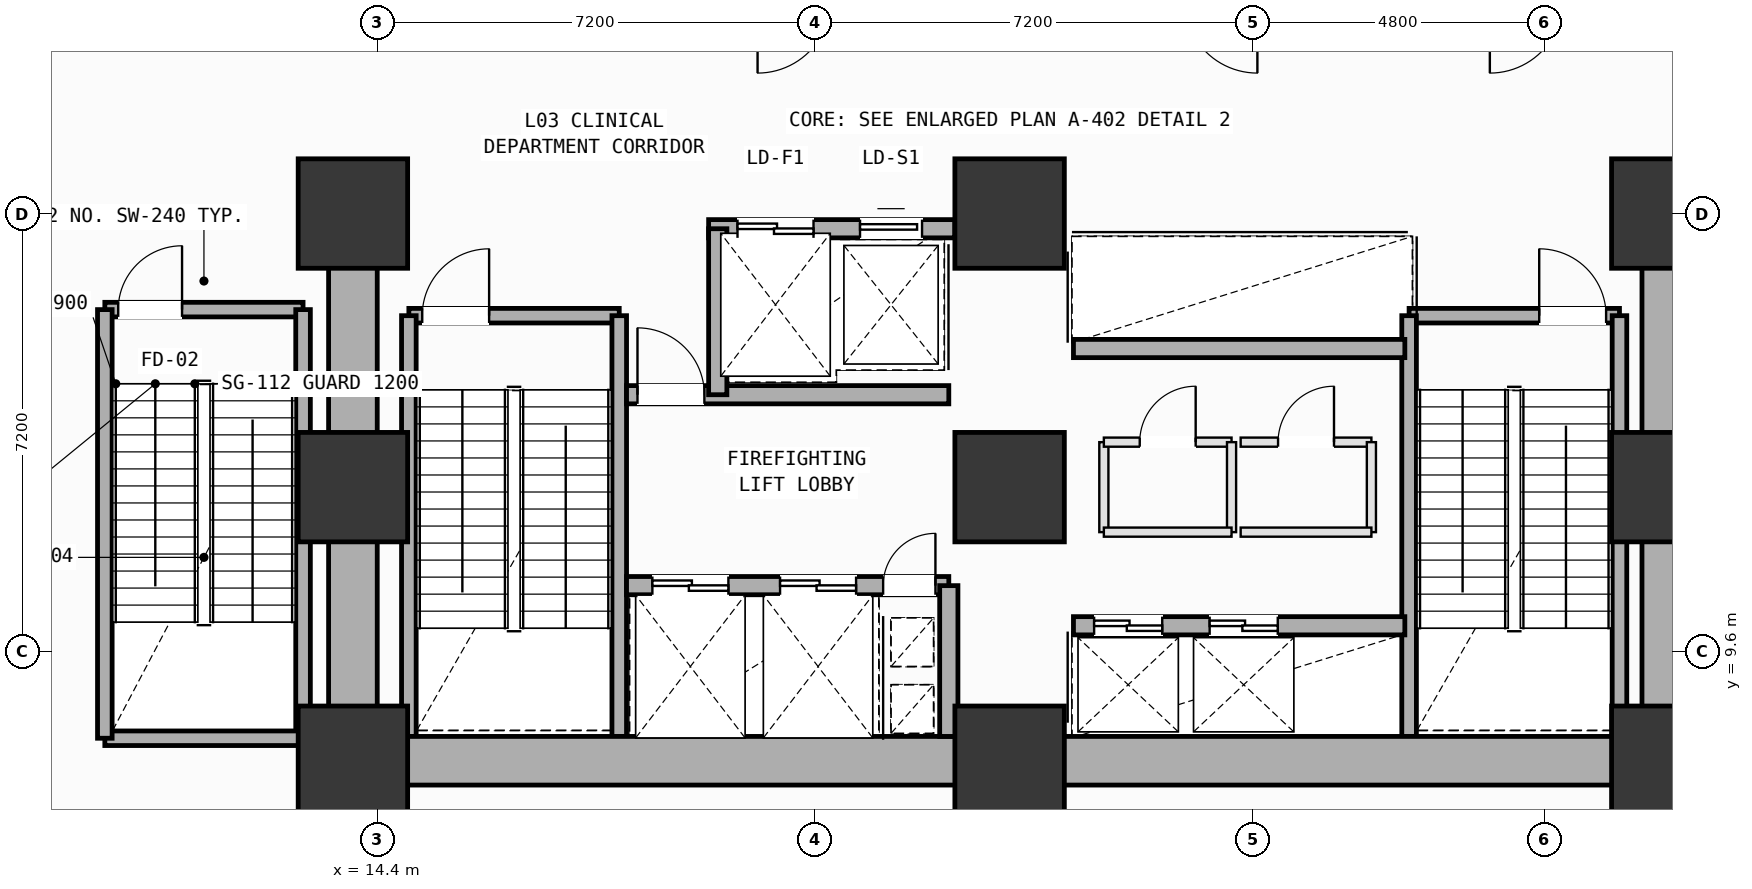
"""IFC4 building model, lengths in metres.
Left out: names, types, materials, properties, quantities, classifications, styles, units other than length and angle.
Written with IfcOpenShell. Run it as: python <this file> out.ifc"""

import sys

from ifc_helpers import new_model, si_unit, direction, frame, frame_2d, origin, origin_2d, place, context, subcontext, project, spatial, rectangle, extrude, element, fill, save


model = new_model("IFC4")
c1 = context("Model", 3, precision=1e-05, world=origin(), true_north=direction((0.0, 1.0)))
c2 = subcontext(c1, "Body", "Model", "MODEL_VIEW")
j1 = project(units=[si_unit("LENGTHUNIT", "METRE"), si_unit("PLANEANGLEUNIT", "RADIAN")], contexts=[c1])
p1 = place(None, origin())
s1 = spatial("IfcSite", under=j1, at=p1, CompositionType="ELEMENT")
p2 = place(p1, origin())
s2 = spatial("IfcBuilding", under=s1, at=p2, CompositionType="ELEMENT")
p3 = place(p2, frame((0.0, 0.0, 16.2)))
s3 = spatial("IfcBuildingStorey", under=s2, at=p3, CompositionType="ELEMENT", Elevation=16.2)
for number, where, z_axis, x_axis in (
    (1, (14.0, 7.8, 0.0), (0.0, 0.0, 1.0), (1.0, 0.0, 0.0)),
    (2, (14.0, 12.3, 0.0), (0.0, 0.0, 1.0), (1.0, 0.0, 0.0)),
    (3, (14.0, 16.8, 0.0), (0.0, 0.0, 1.0), (1.0, 0.0, 0.0)),
    (4, (24.8, 7.8, 0.0), (0.0, 0.0, 1.0), (1.0, 0.0, 0.0)),
    (5, (24.8, 12.3, 0.0), (0.0, 0.0, 1.0), (1.0, 0.0, 0.0)),
    (6, (24.8, 16.8, 0.0), (0.0, 0.0, 1.0), (1.0, 0.0, 0.0)),
    (7, (35.6, 7.8, 0.0), (0.0, 0.0, 1.0), (1.0, 0.0, 0.0)),
    (8, (35.6, 12.3, 0.0), (0.0, 0.0, 1.0), (1.0, 0.0, 0.0)),
    (9, (35.6, 16.8, 0.0), (0.0, 0.0, 1.0), (1.0, 0.0, 0.0)),
):
    element("IfcColumn", number, at=place(p3, frame(where, z_axis=z_axis, x_axis=x_axis)), inside=s3, PredefinedType="COLUMN", context=c2, shape_type="SweptSolid", body=[
        extrude(rectangle(XDim=1.8, YDim=1.8, at=origin_2d()), origin(), (0.0, 0.0, 1.0), 5.4),
    ])
p4 = place(p3, frame((14.92, 15.12, 0.0), z_axis=(0.0, 0.0, 1.0), x_axis=(1.0, 0.0, 0.0)))
e10 = element("IfcWall", 10, at=p4, inside=s3, PredefinedType="SOLIDWALL", context=c2, shape_type="SweptSolid", body=[
    extrude(rectangle(XDim=3.46, YDim=0.24, at=frame_2d((1.73, 0.0))), origin(), (0.0, 0.0, 1.0), 5.15),
])
p5 = place(p4, frame((0.22, 0.0, 0.0)))
e11 = element("IfcOpeningElement", 11, at=p5, cuts=e10, PredefinedType="OPENING", context=c2, shape_type="SweptSolid", body=[
    extrude(rectangle(XDim=1.1, YDim=2.15, at=frame_2d((0.55, 1.075))), frame((0.0, 0.13, 0.0), z_axis=(0.0, -1.0, 0.0), x_axis=(1.0, 0.0, 0.0)), (0.0, 0.0, 1.0), 0.26),
])
for number, where, z_axis, x_axis in (
    (12, (18.38, 15.12, 0.0), (0.0, 0.0, 1.0), (0.0, -1.0, 0.0)),
    (13, (14.92, 8.2, 0.0), (0.0, 0.0, 1.0), (0.0, 1.0, 0.0)),
):
    element("IfcWall", number, at=place(p3, frame(where, z_axis=z_axis, x_axis=x_axis)), inside=s3, PredefinedType="SOLIDWALL", context=c2, shape_type="SweptSolid", body=[
        extrude(rectangle(XDim=6.92, YDim=0.24, at=frame_2d((3.46, 0.0))), origin(), (0.0, 0.0, 1.0), 5.15),
    ])
p6 = place(p3, frame((31.37, 15.12, 0.0), z_axis=(0.0, 0.0, 1.0), x_axis=(1.0, 0.0, 0.0)))
e14 = element("IfcWall", 14, at=p6, inside=s3, PredefinedType="SOLIDWALL", context=c2, shape_type="SweptSolid", body=[
    extrude(rectangle(XDim=3.46, YDim=0.24, at=frame_2d((1.73, 0.0))), origin(), (0.0, 0.0, 1.0), 5.15),
])
p7 = place(p6, frame((2.14, 0.0, 0.0)))
e15 = element("IfcOpeningElement", 15, at=p7, cuts=e14, PredefinedType="OPENING", context=c2, shape_type="SweptSolid", body=[
    extrude(rectangle(XDim=1.1, YDim=2.15, at=frame_2d((0.55, 1.075))), frame((0.0, 0.13, 0.0), z_axis=(0.0, -1.0, 0.0), x_axis=(1.0, 0.0, 0.0)), (0.0, 0.0, 1.0), 0.26),
])
for number, where, z_axis, x_axis in (
    (16, (34.83, 15.12, 0.0), (0.0, 0.0, 1.0), (0.0, -1.0, 0.0)),
    (17, (31.37, 8.2, 0.0), (0.0, 0.0, 1.0), (0.0, 1.0, 0.0)),
):
    element("IfcWall", number, at=place(p3, frame(where, z_axis=z_axis, x_axis=x_axis)), inside=s3, PredefinedType="SOLIDWALL", context=c2, shape_type="SweptSolid", body=[
        extrude(rectangle(XDim=6.92, YDim=0.24, at=frame_2d((3.46, 0.0))), origin(), (0.0, 0.0, 1.0), 5.15),
    ])
p8 = place(p3, frame((9.92, 15.22, 0.0), z_axis=(0.0, 0.0, 1.0), x_axis=(1.0, 0.0, 0.0)))
e18 = element("IfcWall", 18, at=p8, inside=s3, PredefinedType="SOLIDWALL", context=c2, shape_type="SweptSolid", body=[
    extrude(rectangle(XDim=3.26, YDim=0.24, at=frame_2d((1.63, 0.0))), origin(), (0.0, 0.0, 1.0), 5.15),
])
p9 = place(p8, frame((0.22, 0.0, 0.0)))
e19 = element("IfcOpeningElement", 19, at=p9, cuts=e18, PredefinedType="OPENING", context=c2, shape_type="SweptSolid", body=[
    extrude(rectangle(XDim=1.05, YDim=2.15, at=frame_2d((0.525, 1.075))), frame((0.0, 0.13, 0.0), z_axis=(0.0, -1.0, 0.0), x_axis=(1.0, 0.0, 0.0)), (0.0, 0.0, 1.0), 0.26),
])
p10 = place(p3, frame((13.18, 15.22, 0.0), z_axis=(0.0, 0.0, 1.0), x_axis=(0.0, -1.0, 0.0)))
e20 = element("IfcWall", 20, at=p10, inside=s3, PredefinedType="SOLIDWALL", context=c2, shape_type="SweptSolid", body=[
    extrude(rectangle(XDim=7.05, YDim=0.24, at=frame_2d((3.525, 0.0))), origin(), (0.0, 0.0, 1.0), 5.15),
])
p11 = place(p3, frame((13.18, 8.17, 0.0), z_axis=(0.0, 0.0, 1.0), x_axis=(-1.0, 0.0, 0.0)))
e21 = element("IfcWall", 21, at=p11, inside=s3, PredefinedType="SOLIDWALL", context=c2, shape_type="SweptSolid", body=[
    extrude(rectangle(XDim=3.26, YDim=0.24, at=frame_2d((1.63, 0.0))), origin(), (0.0, 0.0, 1.0), 5.15),
])
p12 = place(p3, frame((9.92, 8.17, 0.0), z_axis=(0.0, 0.0, 1.0), x_axis=(0.0, 1.0, 0.0)))
e22 = element("IfcWall", 22, at=p12, inside=s3, PredefinedType="SOLIDWALL", context=c2, shape_type="SweptSolid", body=[
    extrude(rectangle(XDim=7.05, YDim=0.24, at=frame_2d((3.525, 0.0))), origin(), (0.0, 0.0, 1.0), 5.15),
])
for number, where, z_axis, x_axis in (
    (23, (14.0, 7.8, 0.0), (0.0, 0.0, 1.0), (1.0, 0.0, 0.0)),
    (24, (24.8, 7.8, 0.0), (0.0, 0.0, 1.0), (1.0, 0.0, 0.0)),
):
    element("IfcWall", number, at=place(p3, frame(where, z_axis=z_axis, x_axis=x_axis)), inside=s3, PredefinedType="SHEAR", context=c2, shape_type="SweptSolid", body=[
        extrude(rectangle(XDim=10.8, YDim=0.8, at=frame_2d((5.4, 0.0))), origin(), (0.0, 0.0, 1.0), 5.15),
    ])
for number, where, z_axis, x_axis in (
    (25, (35.6, 7.8, 0.0), (0.0, 0.0, 1.0), (0.0, 1.0, 0.0)),
    (26, (14.0, 16.8, 0.0), (0.0, 0.0, 1.0), (0.0, -1.0, 0.0)),
):
    element("IfcWall", number, at=place(p3, frame(where, z_axis=z_axis, x_axis=x_axis)), inside=s3, PredefinedType="SHEAR", context=c2, shape_type="SweptSolid", body=[
        extrude(rectangle(XDim=9.0, YDim=0.8, at=frame_2d((4.5, 0.0))), origin(), (0.0, 0.0, 1.0), 5.15),
    ])
p13 = place(p3, frame((19.85, 16.55, 0.0), z_axis=(0.0, 0.0, 1.0), x_axis=(1.0, 0.0, 0.0)))
e27 = element("IfcWall", 27, at=p13, inside=s3, PredefinedType="SOLIDWALL", context=c2, shape_type="SweptSolid", body=[
    extrude(rectangle(XDim=4.05, YDim=0.3, at=frame_2d((2.025, 0.0))), origin(), (0.0, 0.0, 1.0), 5.15),
])
p14 = place(p13, frame((0.475, 0.0, 0.0)))
e28 = element("IfcOpeningElement", 28, at=p14, cuts=e27, PredefinedType="OPENING", context=c2, shape_type="SweptSolid", body=[
    extrude(rectangle(XDim=1.25, YDim=2.18, at=frame_2d((0.625, 1.09))), frame((0.0, 0.16, 0.0), z_axis=(0.0, -1.0, 0.0), x_axis=(1.0, 0.0, 0.0)), (0.0, 0.0, 1.0), 0.32),
])
p15 = place(p13, frame((2.49, 0.0, 0.0)))
e29 = element("IfcOpeningElement", 29, at=p15, cuts=e27, PredefinedType="OPENING", context=c2, shape_type="SweptSolid", body=[
    extrude(rectangle(XDim=1.02, YDim=2.12, at=frame_2d((0.51, 1.06))), frame((0.0, 0.16, 0.0), z_axis=(0.0, -1.0, 0.0), x_axis=(1.0, 0.0, 0.0)), (0.0, 0.0, 1.0), 0.32),
])
p16 = place(p3, frame((18.5, 10.68, 0.0), z_axis=(0.0, 0.0, 1.0), x_axis=(1.0, 0.0, 0.0)))
e30 = element("IfcWall", 30, at=p16, inside=s3, PredefinedType="SOLIDWALL", context=c2, shape_type="SweptSolid", body=[
    extrude(rectangle(XDim=5.3, YDim=0.3, at=frame_2d((2.65, 0.0))), origin(), (0.0, 0.0, 1.0), 5.15),
])
p17 = place(p16, frame((4.22, 0.0, 0.0)))
e31 = element("IfcOpeningElement", 31, at=p17, cuts=e30, PredefinedType="OPENING", context=c2, shape_type="SweptSolid", body=[
    extrude(rectangle(XDim=0.86, YDim=2.06, at=frame_2d((0.43, 1.03))), frame((0.0, 0.16, 0.0), z_axis=(0.0, -1.0, 0.0), x_axis=(1.0, 0.0, 0.0)), (0.0, 0.0, 1.0), 0.32),
])
p18 = place(p16, frame((0.425, 0.0, 0.0)))
e32 = element("IfcOpeningElement", 32, at=p18, cuts=e30, PredefinedType="OPENING", context=c2, shape_type="SweptSolid", body=[
    extrude(rectangle(XDim=1.25, YDim=2.18, at=frame_2d((0.625, 1.09))), frame((0.0, 0.16, 0.0), z_axis=(0.0, -1.0, 0.0), x_axis=(1.0, 0.0, 0.0)), (0.0, 0.0, 1.0), 0.32),
])
p19 = place(p16, frame((2.525, 0.0, 0.0)))
e33 = element("IfcOpeningElement", 33, at=p19, cuts=e30, PredefinedType="OPENING", context=c2, shape_type="SweptSolid", body=[
    extrude(rectangle(XDim=1.25, YDim=2.18, at=frame_2d((0.625, 1.09))), frame((0.0, 0.16, 0.0), z_axis=(0.0, -1.0, 0.0), x_axis=(1.0, 0.0, 0.0)), (0.0, 0.0, 1.0), 0.32),
])
p20 = place(p3, frame((18.5, 13.82, 0.0), z_axis=(0.0, 0.0, 1.0), x_axis=(1.0, 0.0, 0.0)))
e34 = element("IfcWall", 34, at=p20, inside=s3, PredefinedType="SOLIDWALL", context=c2, shape_type="SweptSolid", body=[
    extrude(rectangle(XDim=5.3, YDim=0.3, at=frame_2d((2.65, 0.0))), origin(), (0.0, 0.0, 1.0), 5.15),
])
p21 = place(p20, frame((0.18, 0.0, 0.0)))
e35 = element("IfcOpeningElement", 35, at=p21, cuts=e34, PredefinedType="OPENING", context=c2, shape_type="SweptSolid", body=[
    extrude(rectangle(XDim=1.1, YDim=2.15, at=frame_2d((0.55, 1.075))), frame((0.0, 0.16, 0.0), z_axis=(0.0, -1.0, 0.0), x_axis=(1.0, 0.0, 0.0)), (0.0, 0.0, 1.0), 0.32),
])
p22 = place(p3, frame((23.8, 8.2, 0.0), z_axis=(0.0, 0.0, 1.0), x_axis=(0.0, 1.0, 0.0)))
e36 = element("IfcWall", 36, at=p22, inside=s3, PredefinedType="SOLIDWALL", context=c2, shape_type="SweptSolid", body=[
    extrude(rectangle(XDim=2.48, YDim=0.3, at=frame_2d((1.24, 0.0))), origin(), (0.0, 0.0, 1.0), 5.15),
])
p23 = place(p3, frame((20.0, 13.82, 0.0), z_axis=(0.0, 0.0, 1.0), x_axis=(0.0, 1.0, 0.0)))
e37 = element("IfcWall", 37, at=p23, inside=s3, PredefinedType="SOLIDWALL", context=c2, shape_type="SweptSolid", body=[
    extrude(rectangle(XDim=2.73, YDim=0.3, at=frame_2d((1.365, 0.0))), origin(), (0.0, 0.0, 1.0), 5.15),
])
p24 = place(p3, frame((25.85, 10.02, 0.0), z_axis=(0.0, 0.0, 1.0), x_axis=(1.0, 0.0, 0.0)))
e38 = element("IfcWall", 38, at=p24, inside=s3, PredefinedType="SOLIDWALL", context=c2, shape_type="SweptSolid", body=[
    extrude(rectangle(XDim=5.45, YDim=0.3, at=frame_2d((2.725, 0.0))), origin(), (0.0, 0.0, 1.0), 5.15),
])
p25 = place(p24, frame((0.34, 0.0, 0.0)))
e39 = element("IfcOpeningElement", 39, at=p25, cuts=e38, PredefinedType="OPENING", context=c2, shape_type="SweptSolid", body=[
    extrude(rectangle(XDim=1.12, YDim=2.15, at=frame_2d((0.56, 1.075))), frame((0.0, 0.16, 0.0), z_axis=(0.0, -1.0, 0.0), x_axis=(1.0, 0.0, 0.0)), (0.0, 0.0, 1.0), 0.32),
])
p26 = place(p24, frame((2.24, 0.0, 0.0)))
e40 = element("IfcOpeningElement", 40, at=p26, cuts=e38, PredefinedType="OPENING", context=c2, shape_type="SweptSolid", body=[
    extrude(rectangle(XDim=1.12, YDim=2.15, at=frame_2d((0.56, 1.075))), frame((0.0, 0.16, 0.0), z_axis=(0.0, -1.0, 0.0), x_axis=(1.0, 0.0, 0.0)), (0.0, 0.0, 1.0), 0.32),
])
p27 = place(p3, frame((25.85, 14.58, 0.0), z_axis=(0.0, 0.0, 1.0), x_axis=(1.0, 0.0, 0.0)))
e41 = element("IfcWall", 41, at=p27, inside=s3, PredefinedType="SOLIDWALL", context=c2, shape_type="SweptSolid", body=[
    extrude(rectangle(XDim=5.45, YDim=0.3, at=frame_2d((2.725, 0.0))), origin(), (0.0, 0.0, 1.0), 5.15),
])
p28 = place(p3, frame((26.35, 11.56, 0.0), z_axis=(0.0, 0.0, 1.0), x_axis=(0.0, 1.0, 0.0)))
e42 = element("IfcWall", 42, at=p28, inside=s3, PredefinedType="PARTITIONING", context=c2, shape_type="SweptSolid", body=[
    extrude(rectangle(XDim=1.48, YDim=0.15, at=frame_2d((0.74, 0.0))), origin(), (0.0, 0.0, 1.0), 5.15),
])
p29 = place(p3, frame((26.35, 13.04, 0.0), z_axis=(0.0, 0.0, 1.0), x_axis=(1.0, 0.0, 0.0)))
e43 = element("IfcWall", 43, at=p29, inside=s3, PredefinedType="PARTITIONING", context=c2, shape_type="SweptSolid", body=[
    extrude(rectangle(XDim=2.1, YDim=0.15, at=frame_2d((1.05, 0.0))), origin(), (0.0, 0.0, 1.0), 5.15),
])
p30 = place(p29, frame((0.59, 0.0, 0.0)))
e44 = element("IfcOpeningElement", 44, at=p30, cuts=e43, PredefinedType="OPENING", context=c2, shape_type="SweptSolid", body=[
    extrude(rectangle(XDim=0.92, YDim=2.1, at=frame_2d((0.46, 1.05))), frame((0.0, 0.085, 0.0), z_axis=(0.0, -1.0, 0.0), x_axis=(1.0, 0.0, 0.0)), (0.0, 0.0, 1.0), 0.17),
])
p31 = place(p3, frame((28.45, 13.04, 0.0), z_axis=(0.0, 0.0, 1.0), x_axis=(0.0, -1.0, 0.0)))
e45 = element("IfcWall", 45, at=p31, inside=s3, PredefinedType="PARTITIONING", context=c2, shape_type="SweptSolid", body=[
    extrude(rectangle(XDim=1.48, YDim=0.15, at=frame_2d((0.74, 0.0))), origin(), (0.0, 0.0, 1.0), 5.15),
])
p32 = place(p3, frame((28.45, 11.56, 0.0), z_axis=(0.0, 0.0, 1.0), x_axis=(-1.0, 0.0, 0.0)))
e46 = element("IfcWall", 46, at=p32, inside=s3, PredefinedType="PARTITIONING", context=c2, shape_type="SweptSolid", body=[
    extrude(rectangle(XDim=2.1, YDim=0.15, at=frame_2d((1.05, 0.0))), origin(), (0.0, 0.0, 1.0), 5.15),
])
p33 = place(p3, frame((28.6, 13.04, 0.0), z_axis=(0.0, 0.0, 1.0), x_axis=(1.0, 0.0, 0.0)))
e47 = element("IfcWall", 47, at=p33, inside=s3, PredefinedType="PARTITIONING", context=c2, shape_type="SweptSolid", body=[
    extrude(rectangle(XDim=2.15, YDim=0.15, at=frame_2d((1.075, 0.0))), origin(), (0.0, 0.0, 1.0), 5.15),
])
p34 = place(p33, frame((0.615, 0.0, 0.0)))
e48 = element("IfcOpeningElement", 48, at=p34, cuts=e47, PredefinedType="OPENING", context=c2, shape_type="SweptSolid", body=[
    extrude(rectangle(XDim=0.92, YDim=2.1, at=frame_2d((0.46, 1.05))), frame((0.0, 0.085, 0.0), z_axis=(0.0, -1.0, 0.0), x_axis=(1.0, 0.0, 0.0)), (0.0, 0.0, 1.0), 0.17),
])
p35 = place(p3, frame((30.75, 13.04, 0.0), z_axis=(0.0, 0.0, 1.0), x_axis=(0.0, -1.0, 0.0)))
e49 = element("IfcWall", 49, at=p35, inside=s3, PredefinedType="PARTITIONING", context=c2, shape_type="SweptSolid", body=[
    extrude(rectangle(XDim=1.48, YDim=0.15, at=frame_2d((0.74, 0.0))), origin(), (0.0, 0.0, 1.0), 5.15),
])
p36 = place(p3, frame((30.75, 11.56, 0.0), z_axis=(0.0, 0.0, 1.0), x_axis=(-1.0, 0.0, 0.0)))
e50 = element("IfcWall", 50, at=p36, inside=s3, PredefinedType="PARTITIONING", context=c2, shape_type="SweptSolid", body=[
    extrude(rectangle(XDim=2.15, YDim=0.15, at=frame_2d((1.075, 0.0))), origin(), (0.0, 0.0, 1.0), 5.15),
])
p37 = place(p5, origin())
e51 = element("IfcDoor", 51, at=p37, inside=s3, OperationType="SINGLE_SWING_RIGHT", PredefinedType="DOOR", context=c2, shape_type="SweptSolid", body=[
    extrude(rectangle(XDim=1.1, YDim=2.15, at=frame_2d((0.55, 1.075))), frame((0.0, 0.025, 0.0), z_axis=(0.0, -1.0, 0.0), x_axis=(1.0, 0.0, 0.0)), (0.0, 0.0, 1.0), 0.05),
])
fill(e11, e51)
p38 = place(p7, origin())
e52 = element("IfcDoor", 52, at=p38, inside=s3, OperationType="SINGLE_SWING_LEFT", PredefinedType="DOOR", context=c2, shape_type="SweptSolid", body=[
    extrude(rectangle(XDim=1.1, YDim=2.15, at=frame_2d((0.55, 1.075))), frame((0.0, 0.025, 0.0), z_axis=(0.0, -1.0, 0.0), x_axis=(1.0, 0.0, 0.0)), (0.0, 0.0, 1.0), 0.05),
])
fill(e15, e52)
p39 = place(p9, origin())
e53 = element("IfcDoor", 53, at=p39, inside=s3, OperationType="SINGLE_SWING_RIGHT", PredefinedType="DOOR", context=c2, shape_type="SweptSolid", body=[
    extrude(rectangle(XDim=1.05, YDim=2.15, at=frame_2d((0.525, 1.075))), frame((0.0, 0.025, 0.0), z_axis=(0.0, -1.0, 0.0), x_axis=(1.0, 0.0, 0.0)), (0.0, 0.0, 1.0), 0.05),
])
fill(e19, e53)
p40 = place(p17, origin())
e54 = element("IfcDoor", 54, at=p40, inside=s3, OperationType="SINGLE_SWING_RIGHT", PredefinedType="DOOR", context=c2, shape_type="SweptSolid", body=[
    extrude(rectangle(XDim=0.86, YDim=2.06, at=frame_2d((0.43, 1.03))), frame((0.0, 0.025, 0.0), z_axis=(0.0, -1.0, 0.0), x_axis=(1.0, 0.0, 0.0)), (0.0, 0.0, 1.0), 0.05),
])
fill(e31, e54)
p41 = place(p21, origin())
e55 = element("IfcDoor", 55, at=p41, inside=s3, OperationType="SINGLE_SWING_LEFT", PredefinedType="DOOR", context=c2, shape_type="SweptSolid", body=[
    extrude(rectangle(XDim=1.1, YDim=2.15, at=frame_2d((0.55, 1.075))), frame((0.0, 0.025, 0.0), z_axis=(0.0, -1.0, 0.0), x_axis=(1.0, 0.0, 0.0)), (0.0, 0.0, 1.0), 0.05),
])
fill(e35, e55)
p42 = place(p18, origin())
e56 = element("IfcDoor", 56, at=p42, inside=s3, OperationType="DOUBLE_DOOR_SLIDING", PredefinedType="DOOR", context=c2, shape_type="SweptSolid", body=[
    extrude(rectangle(XDim=1.25, YDim=2.18, at=frame_2d((0.625, 1.09))), frame((0.0, 0.025, 0.0), z_axis=(0.0, -1.0, 0.0), x_axis=(1.0, 0.0, 0.0)), (0.0, 0.0, 1.0), 0.05),
])
fill(e32, e56)
p43 = place(p19, origin())
e57 = element("IfcDoor", 57, at=p43, inside=s3, OperationType="DOUBLE_DOOR_SLIDING", PredefinedType="DOOR", context=c2, shape_type="SweptSolid", body=[
    extrude(rectangle(XDim=1.25, YDim=2.18, at=frame_2d((0.625, 1.09))), frame((0.0, 0.025, 0.0), z_axis=(0.0, -1.0, 0.0), x_axis=(1.0, 0.0, 0.0)), (0.0, 0.0, 1.0), 0.05),
])
fill(e33, e57)
p44 = place(p25, origin())
e58 = element("IfcDoor", 58, at=p44, inside=s3, OperationType="DOUBLE_DOOR_SLIDING", PredefinedType="DOOR", context=c2, shape_type="SweptSolid", body=[
    extrude(rectangle(XDim=1.12, YDim=2.15, at=frame_2d((0.56, 1.075))), frame((0.0, 0.025, 0.0), z_axis=(0.0, -1.0, 0.0), x_axis=(1.0, 0.0, 0.0)), (0.0, 0.0, 1.0), 0.05),
])
fill(e39, e58)
p45 = place(p26, origin())
e59 = element("IfcDoor", 59, at=p45, inside=s3, OperationType="DOUBLE_DOOR_SLIDING", PredefinedType="DOOR", context=c2, shape_type="SweptSolid", body=[
    extrude(rectangle(XDim=1.12, YDim=2.15, at=frame_2d((0.56, 1.075))), frame((0.0, 0.025, 0.0), z_axis=(0.0, -1.0, 0.0), x_axis=(1.0, 0.0, 0.0)), (0.0, 0.0, 1.0), 0.05),
])
fill(e40, e59)
p46 = place(p14, origin())
e60 = element("IfcDoor", 60, at=p46, inside=s3, OperationType="DOUBLE_DOOR_SLIDING", PredefinedType="DOOR", context=c2, shape_type="SweptSolid", body=[
    extrude(rectangle(XDim=1.25, YDim=2.18, at=frame_2d((0.625, 1.09))), frame((0.0, 0.025, 0.0), z_axis=(0.0, -1.0, 0.0), x_axis=(1.0, 0.0, 0.0)), (0.0, 0.0, 1.0), 0.05),
])
fill(e28, e60)
p47 = place(p15, origin())
e61 = element("IfcDoor", 61, at=p47, inside=s3, OperationType="SLIDING_TO_LEFT", PredefinedType="DOOR", context=c2, shape_type="SweptSolid", body=[
    extrude(rectangle(XDim=1.02, YDim=2.12, at=frame_2d((0.51, 1.06))), frame((0.0, 0.025, 0.0), z_axis=(0.0, -1.0, 0.0), x_axis=(1.0, 0.0, 0.0)), (0.0, 0.0, 1.0), 0.05),
])
fill(e29, e61)
p48 = place(p30, origin())
e62 = element("IfcDoor", 62, at=p48, inside=s3, OperationType="SINGLE_SWING_RIGHT", PredefinedType="DOOR", context=c2, shape_type="SweptSolid", body=[
    extrude(rectangle(XDim=0.92, YDim=2.1, at=frame_2d((0.46, 1.05))), frame((0.0, 0.025, 0.0), z_axis=(0.0, -1.0, 0.0), x_axis=(1.0, 0.0, 0.0)), (0.0, 0.0, 1.0), 0.05),
])
fill(e44, e62)
p49 = place(p34, origin())
e63 = element("IfcDoor", 63, at=p49, inside=s3, OperationType="SINGLE_SWING_RIGHT", PredefinedType="DOOR", context=c2, shape_type="SweptSolid", body=[
    extrude(rectangle(XDim=0.92, YDim=2.1, at=frame_2d((0.46, 1.05))), frame((0.0, 0.025, 0.0), z_axis=(0.0, -1.0, 0.0), x_axis=(1.0, 0.0, 0.0)), (0.0, 0.0, 1.0), 0.05),
])
fill(e48, e63)
save(model, sys.argv[1])
